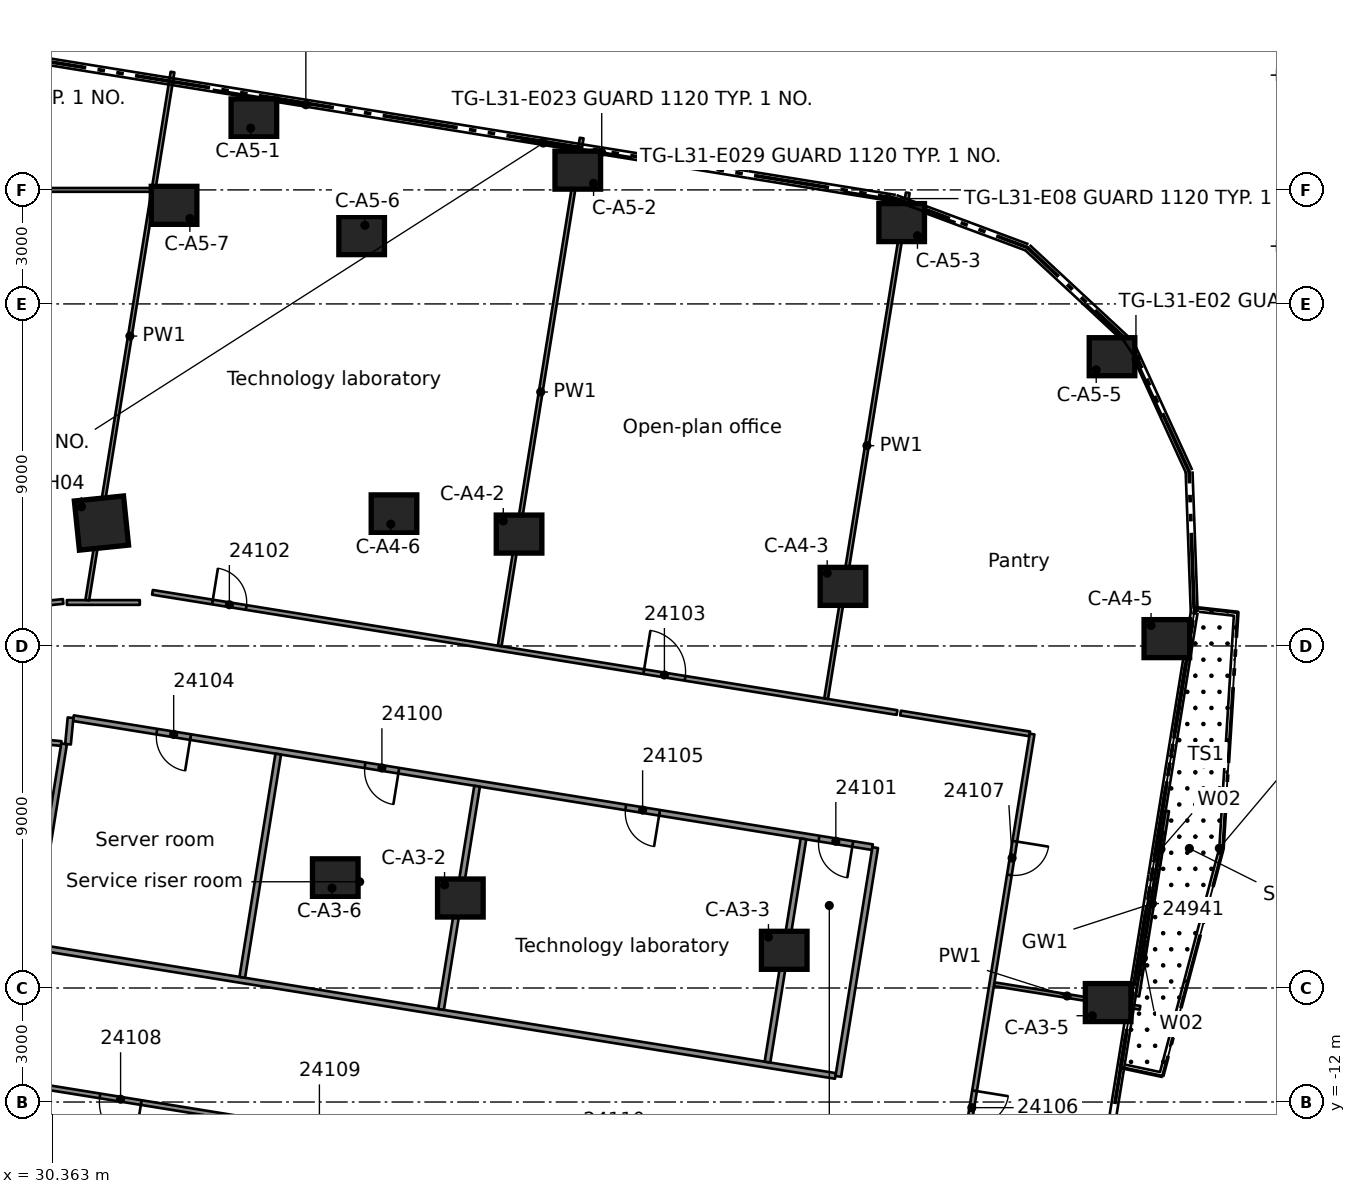
"""IFC4 building model, lengths in metres.
Left out: names, types, materials, properties, quantities, classifications, styles, units other than length and angle.
Written with IfcOpenShell. Run it as: python <this file> out.ifc"""

import sys

from ifc_helpers import new_model, si_unit, direction, frame, frame_2d, origin, origin_2d, place, context, subcontext, project, spatial, rectangle, extrude, element, fill, save


model = new_model("IFC4")
c1 = context("Model", 3, precision=1e-05, world=origin(), true_north=direction((0.0, 1.0)))
c2 = subcontext(c1, "Body", "Model", "MODEL_VIEW")
j1 = project(units=[si_unit("LENGTHUNIT", "METRE"), si_unit("PLANEANGLEUNIT", "RADIAN")], contexts=[c1])
p1 = place(None, origin())
s1 = spatial("IfcSite", under=j1, at=p1, CompositionType="ELEMENT")
p2 = place(p1, origin())
s2 = spatial("IfcBuilding", under=s1, at=p2, CompositionType="ELEMENT")
p3 = place(p2, frame((0.0, 0.0, 123.7)))
s3 = spatial("IfcBuildingStorey", under=s2, at=p3, CompositionType="ELEMENT", Elevation=123.7)
for number, where, z_axis, x_axis in (
    (1, (41.102, -6.632, 0.0), (0.0, 0.0, 1.0), (1.0, 0.0, 0.0)),
    (2, (49.625, -8.008, 0.0), (0.0, 0.0, 1.0), (1.0, 0.0, 0.0)),
    (3, (58.148, -9.383, 0.0), (0.0, 0.0, 1.0), (1.0, 0.0, 0.0)),
    (4, (37.811, -6.101, 0.0), (0.0, 0.0, 1.0), (1.0, 0.0, 0.0)),
    (5, (42.647, 2.944, 0.0), (0.0, 0.0, 1.0), (1.0, 0.0, 0.0)),
    (6, (51.17, 1.568, 0.0), (0.0, 0.0, 1.0), (1.0, 0.0, 0.0)),
    (7, (59.693, 0.193, 0.0), (0.0, 0.0, 1.0), (1.0, 0.0, 0.0)),
    (8, (39.356, 3.475, 0.0), (0.0, 0.0, 1.0), (1.0, 0.0, 0.0)),
    (9, (35.669, 13.895, 0.0), (0.0, 0.0, 1.0), (1.0, 0.0, 0.0)),
    (10, (44.192, 12.52, 0.0), (0.0, 0.0, 1.0), (1.0, 0.0, 0.0)),
    (11, (52.715, 11.14, 0.0), (0.0, 0.0, 1.0), (1.0, 0.0, 0.0)),
    (12, (58.25, 7.611, 0.0), (0.0, 0.0, 1.0), (1.0, 0.0, 0.0)),
    (13, (38.505, 10.797, 0.0), (0.0, 0.0, 1.0), (1.0, 0.0, 0.0)),
    (14, (33.569, 11.594, 0.0), (0.0, 0.0, 1.0), (1.0, 0.0, 0.0)),
):
    element("IfcColumn", number, at=place(p3, frame(where, z_axis=z_axis, x_axis=x_axis)), inside=s3, PredefinedType="COLUMN", context=c2, shape_type="SweptSolid", body=[
        extrude(rectangle(XDim=1.2, YDim=1.0, at=origin_2d()), origin(), (0.0, 0.0, 1.0), 3.5),
    ])
p4 = place(p3, frame((31.658, 3.234, 0.0), z_axis=(0.0, 0.0, 1.0), x_axis=(0.994822339568, 0.101629290543, 0.0)))
e15 = element("IfcColumn", 15, at=p4, inside=s3, PredefinedType="COLUMN", context=c2, shape_type="SweptSolid", body=[
    extrude(rectangle(XDim=1.3, YDim=1.3, at=origin_2d()), origin(), (0.0, 0.0, 1.0), 3.5),
])
p5 = place(p3, frame((59.701, -4.341, 0.0), z_axis=(0.0, 0.0, 1.0), x_axis=(-0.159319524755, -0.987227070654, 0.0)))
e16 = element("IfcWall", 16, at=p5, inside=s3, PredefinedType="STANDARD", context=c2, shape_type="SweptSolid", body=[
    extrude(rectangle(XDim=4.936, YDim=0.1, at=frame_2d((2.468, 0.0))), origin(), (0.0, 0.0, 1.0), 3.1),
])
p6 = place(p5, frame((1.568, 0.0, 0.0)))
e17 = element("IfcOpeningElement", 17, at=p6, cuts=e16, PredefinedType="OPENING", context=c2, shape_type="SweptSolid", body=[
    extrude(rectangle(XDim=1.8, YDim=2.4, at=frame_2d((0.9, 1.2))), frame((0.0, 0.06, 0.0), z_axis=(0.0, -1.0, 0.0), x_axis=(1.0, 0.0, 0.0)), (0.0, 0.0, 1.0), 0.12),
])
p7 = place(p5, frame((0.568, 0.0, 0.0)))
e18 = element("IfcOpeningElement", 18, at=p7, cuts=e16, PredefinedType="OPENING", context=c2, shape_type="SweptSolid", body=[
    extrude(rectangle(XDim=0.9, YDim=2.4, at=frame_2d((0.45, 1.2))), frame((0.0, 0.06, 0.0), z_axis=(0.0, -1.0, 0.0), x_axis=(1.0, 0.0, 0.0)), (0.0, 0.0, 1.0), 0.12),
])
p8 = place(p5, frame((3.468, 0.0, 0.0)))
e19 = element("IfcOpeningElement", 19, at=p8, cuts=e16, PredefinedType="OPENING", context=c2, shape_type="SweptSolid", body=[
    extrude(rectangle(XDim=0.9, YDim=2.4, at=frame_2d((0.45, 1.2))), frame((0.0, 0.06, 0.0), z_axis=(0.0, -1.0, 0.0), x_axis=(1.0, 0.0, 0.0)), (0.0, 0.0, 1.0), 0.12),
])
p9 = place(p3, frame((52.457, -15.204, 0.0), z_axis=(0.0, 0.0, 1.0), x_axis=(-0.987211158264, 0.159418094953, 0.0)))
e20 = element("IfcWall", 20, at=p9, inside=s3, PredefinedType="PARTITIONING", context=c2, shape_type="SweptSolid", body=[
    extrude(rectangle(XDim=23.235, YDim=0.125, at=frame_2d((11.618, 0.0))), origin(), (0.0, 0.0, 1.0), 3.08),
])
p10 = place(p9, frame((20.009, 0.0, 0.0)))
e21 = element("IfcOpeningElement", 21, at=p10, cuts=e20, PredefinedType="OPENING", context=c2, shape_type="SweptSolid", body=[
    extrude(rectangle(XDim=1.1, YDim=2.1, at=frame_2d((0.55, 1.05))), frame((0.0, 0.073, 0.0), z_axis=(0.0, -1.0, 0.0), x_axis=(1.0, 0.0, 0.0)), (0.0, 0.0, 1.0), 0.145),
])
p11 = place(p9, frame((14.709, 0.0, 0.0)))
e22 = element("IfcOpeningElement", 22, at=p11, cuts=e20, PredefinedType="OPENING", context=c2, shape_type="SweptSolid", body=[
    extrude(rectangle(XDim=1.1, YDim=2.1, at=frame_2d((0.55, 1.05))), frame((0.0, 0.073, 0.0), z_axis=(0.0, -1.0, 0.0), x_axis=(1.0, 0.0, 0.0)), (0.0, 0.0, 1.0), 0.145),
])
p12 = place(p9, frame((7.759, 0.0, 0.0)))
e23 = element("IfcOpeningElement", 23, at=p12, cuts=e20, PredefinedType="OPENING", context=c2, shape_type="SweptSolid", body=[
    extrude(rectangle(XDim=0.9, YDim=2.1, at=frame_2d((0.45, 1.05))), frame((0.0, 0.073, 0.0), z_axis=(0.0, -1.0, 0.0), x_axis=(1.0, 0.0, 0.0)), (0.0, 0.0, 1.0), 0.145),
])
p13 = place(p3, frame((30.005, -7.931, 0.0), z_axis=(0.0, 0.0, 1.0), x_axis=(0.987232842174, -0.15928375728, 0.0)))
e24 = element("IfcWall", 24, at=p13, inside=s3, PredefinedType="PARTITIONING", context=c2, shape_type="SweptSolid", body=[
    extrude(rectangle(XDim=21.239, YDim=0.15, at=frame_2d((10.62, 0.0))), origin(), (0.0, 0.0, 1.0), 3.08),
])
p14 = place(p3, frame((55.149, -8.9, 0.0), z_axis=(0.0, 0.0, 1.0), x_axis=(0.987198096363, -0.159498960929, 0.0)))
e25 = element("IfcWall", 25, at=p14, inside=s3, PredefinedType="PARTITIONING", context=c2, shape_type="SweptSolid", body=[
    extrude(rectangle(XDim=3.888, YDim=0.1, at=frame_2d((1.944, 0.0))), origin(), (0.0, 0.0, 1.0), 3.08),
])
p15 = place(p3, frame((51.945, -5.294, 0.0), z_axis=(0.0, 0.0, 1.0), x_axis=(-0.98722094224, 0.159357494967, 0.0)))
e26 = element("IfcWall", 26, at=p15, inside=s3, PredefinedType="PARTITIONING", context=c2, shape_type="SweptSolid", body=[
    extrude(rectangle(XDim=21.298, YDim=0.15, at=frame_2d((10.649, 0.0))), origin(), (0.0, 0.0, 1.0), 3.08),
])
p16 = place(p15, frame((12.624, 0.0, 0.0)))
e27 = element("IfcOpeningElement", 27, at=p16, cuts=e26, PredefinedType="OPENING", context=c2, shape_type="SweptSolid", body=[
    extrude(rectangle(XDim=0.9, YDim=2.1, at=frame_2d((0.45, 1.05))), frame((0.0, 0.085, 0.0), z_axis=(0.0, -1.0, 0.0), x_axis=(1.0, 0.0, 0.0)), (0.0, 0.0, 1.0), 0.17),
])
p17 = place(p15, frame((0.525, 0.0, 0.0)))
e28 = element("IfcOpeningElement", 28, at=p17, cuts=e26, PredefinedType="OPENING", context=c2, shape_type="SweptSolid", body=[
    extrude(rectangle(XDim=0.9, YDim=2.1, at=frame_2d((0.45, 1.05))), frame((0.0, 0.085, 0.0), z_axis=(0.0, -1.0, 0.0), x_axis=(1.0, 0.0, 0.0)), (0.0, 0.0, 1.0), 0.17),
])
p18 = place(p15, frame((18.175, 0.0, 0.0)))
e29 = element("IfcOpeningElement", 29, at=p18, cuts=e26, PredefinedType="OPENING", context=c2, shape_type="SweptSolid", body=[
    extrude(rectangle(XDim=0.9, YDim=2.1, at=frame_2d((0.45, 1.05))), frame((0.0, 0.085, 0.0), z_axis=(0.0, -1.0, 0.0), x_axis=(1.0, 0.0, 0.0)), (0.0, 0.0, 1.0), 0.17),
])
p19 = place(p15, frame((5.675, 0.0, 0.0)))
e30 = element("IfcOpeningElement", 30, at=p19, cuts=e26, PredefinedType="OPENING", context=c2, shape_type="SweptSolid", body=[
    extrude(rectangle(XDim=0.9, YDim=2.1, at=frame_2d((0.45, 1.05))), frame((0.0, 0.085, 0.0), z_axis=(0.0, -1.0, 0.0), x_axis=(1.0, 0.0, 0.0)), (0.0, 0.0, 1.0), 0.17),
])
p20 = place(p3, frame((33.0, 1.411, 0.0), z_axis=(0.0, 0.0, 1.0), x_axis=(0.987218652985, -0.159371676275, 0.0)))
e31 = element("IfcWall", 31, at=p20, inside=s3, PredefinedType="PARTITIONING", context=c2, shape_type="SweptSolid", body=[
    extrude(rectangle(XDim=19.846, YDim=0.125, at=frame_2d((9.923, 0.0))), origin(), (0.0, 0.0, 1.0), 3.08),
])
p21 = place(p20, frame((1.6, 0.0, 0.0)))
e32 = element("IfcOpeningElement", 32, at=p21, cuts=e31, PredefinedType="OPENING", context=c2, shape_type="SweptSolid", body=[
    extrude(rectangle(XDim=0.9, YDim=2.1, at=frame_2d((0.45, 1.05))), frame((0.0, 0.073, 0.0), z_axis=(0.0, -1.0, 0.0), x_axis=(1.0, 0.0, 0.0)), (0.0, 0.0, 1.0), 0.145),
])
p22 = place(p20, frame((13.096, 0.0, 0.0)))
e33 = element("IfcOpeningElement", 33, at=p22, cuts=e31, PredefinedType="OPENING", context=c2, shape_type="SweptSolid", body=[
    extrude(rectangle(XDim=1.1, YDim=2.1, at=frame_2d((0.55, 1.05))), frame((0.0, 0.073, 0.0), z_axis=(0.0, -1.0, 0.0), x_axis=(1.0, 0.0, 0.0)), (0.0, 0.0, 1.0), 0.145),
])
p23 = place(p3, frame((52.685, -1.765, 0.0), z_axis=(0.0, 0.0, 1.0), x_axis=(0.987209106982, -0.159430797185, 0.0)))
e34 = element("IfcWall", 34, at=p23, inside=s3, PredefinedType="PARTITIONING", context=c2, shape_type="SweptSolid", body=[
    extrude(rectangle(XDim=3.444, YDim=0.125, at=frame_2d((1.722, 0.0))), origin(), (0.0, 0.0, 1.0), 3.08),
])
p24 = place(p3, frame((30.6, -2.567, 0.0), z_axis=(0.0, 0.0, 1.0), x_axis=(-0.995450531819, 0.095279791669, 0.0)))
e35 = element("IfcWall", 35, at=p24, inside=s3, PredefinedType="PARTITIONING", context=c2, shape_type="SweptSolid", body=[
    extrude(rectangle(XDim=9.13, YDim=0.125, at=frame_2d((4.565, 0.0))), origin(), (0.0, 0.0, 1.0), 3.08),
])
p25 = place(p24, frame((2.525, 0.0, 0.0)))
e36 = element("IfcOpeningElement", 36, at=p25, cuts=e35, PredefinedType="OPENING", context=c2, shape_type="SweptSolid", body=[
    extrude(rectangle(XDim=0.9, YDim=2.1, at=frame_2d((0.45, 1.05))), frame((0.0, 0.073, 0.0), z_axis=(0.0, -1.0, 0.0), x_axis=(1.0, 0.0, 0.0)), (0.0, 0.0, 1.0), 0.145),
])
p26 = place(p3, frame((30.748, 1.144, 0.0), z_axis=(0.0, 0.0, 1.0), x_axis=(1.0, 0.0, 0.0)))
e37 = element("IfcWall", 37, at=p26, inside=s3, PredefinedType="PARTITIONING", context=c2, shape_type="SweptSolid", body=[
    extrude(rectangle(XDim=1.919, YDim=0.125, at=frame_2d((0.959, 0.0))), origin(), (0.0, 0.0, 1.0), 3.08),
])
p27 = place(p3, frame((21.512, 12.0, 0.0), z_axis=(0.0, 0.0, 1.0), x_axis=(1.0, 0.0, 0.0)))
e38 = element("IfcWall", 38, at=p27, inside=s3, PredefinedType="PARTITIONING", context=c2, shape_type="SweptSolid", body=[
    extrude(rectangle(XDim=11.465, YDim=0.1, at=frame_2d((5.732, 0.0))), origin(), (0.0, 0.0, 1.0), 3.08),
])
p28 = place(p3, frame((29.917, 1.096, 0.0), z_axis=(0.0, 0.0, 1.0), x_axis=(0.994811579601, 0.101734561938, 0.0)))
e39 = element("IfcWall", 39, at=p28, inside=s3, PredefinedType="PARTITIONING", context=c2, shape_type="SweptSolid", body=[
    extrude(rectangle(XDim=0.737, YDim=0.125, at=frame_2d((0.368, 0.0))), origin(), (0.0, 0.0, 1.0), 3.08),
])
p29 = place(p3, frame((56.147, -2.317, 0.0), z_axis=(0.0, 0.0, 1.0), x_axis=(-0.159220326338, -0.987243074263, 0.0)))
e40 = element("IfcWall", 40, at=p29, inside=s3, PredefinedType="PARTITIONING", context=c2, shape_type="SweptSolid", body=[
    extrude(rectangle(XDim=13.308, YDim=0.125, at=frame_2d((6.654, 0.0))), origin(), (0.0, 0.0, 1.0), 3.08),
])
p30 = place(p29, frame((9.508, 0.0, 0.0)))
e41 = element("IfcOpeningElement", 41, at=p30, cuts=e40, PredefinedType="OPENING", context=c2, shape_type="SweptSolid", body=[
    extrude(rectangle(XDim=0.9, YDim=2.1, at=frame_2d((0.45, 1.05))), frame((0.0, 0.073, 0.0), z_axis=(0.0, -1.0, 0.0), x_axis=(1.0, 0.0, 0.0)), (0.0, 0.0, 1.0), 0.145),
])
p31 = place(p29, frame((2.857, 0.0, 0.0)))
e42 = element("IfcOpeningElement", 42, at=p31, cuts=e40, PredefinedType="OPENING", context=c2, shape_type="SweptSolid", body=[
    extrude(rectangle(XDim=0.9, YDim=2.1, at=frame_2d((0.45, 1.05))), frame((0.0, 0.073, 0.0), z_axis=(0.0, -1.0, 0.0), x_axis=(1.0, 0.0, 0.0)), (0.0, 0.0, 1.0), 0.145),
])
p32 = place(p3, frame((51.047, -11.326, 0.0), z_axis=(0.0, 0.0, 1.0), x_axis=(0.159359551121, 0.987220610333, 0.0)))
e43 = element("IfcWall", 43, at=p32, inside=s3, PredefinedType="PARTITIONING", context=c2, shape_type="SweptSolid", body=[
    extrude(rectangle(XDim=6.099, YDim=0.15, at=frame_2d((3.049, 0.0))), origin(), (0.0, 0.0, 1.0), 3.08),
])
p33 = place(p3, frame((49.184, -10.949, 0.0), z_axis=(0.0, 0.0, 1.0), x_axis=(0.159192439694, 0.987247571354, 0.0)))
e44 = element("IfcWall", 44, at=p33, inside=s3, PredefinedType="PARTITIONING", context=c2, shape_type="SweptSolid", body=[
    extrude(rectangle(XDim=5.949, YDim=0.15, at=frame_2d((2.975, 0.0))), origin(), (0.0, 0.0, 1.0), 3.08),
])
p34 = place(p3, frame((50.727, -1.385, 0.0), z_axis=(0.0, 0.0, 1.0), x_axis=(0.159328091928, 0.987225688038, 0.0)))
e45 = element("IfcWall", 45, at=p34, inside=s3, PredefinedType="PARTITIONING", context=c2, shape_type="SweptSolid", body=[
    extrude(rectangle(XDim=13.481, YDim=0.1, at=frame_2d((6.741, 0.0))), origin(), (0.0, 0.0, 1.0), 3.08),
])
p35 = place(p3, frame((40.595, -9.563, 0.0), z_axis=(0.0, 0.0, 1.0), x_axis=(0.159352431511, 0.987221759572, 0.0)))
e46 = element("IfcWall", 46, at=p35, inside=s3, PredefinedType="PARTITIONING", context=c2, shape_type="SweptSolid", body=[
    extrude(rectangle(XDim=5.949, YDim=0.15, at=frame_2d((2.975, 0.0))), origin(), (0.0, 0.0, 1.0), 3.08),
])
p36 = place(p3, frame((42.138, 0.0, 0.0), z_axis=(0.0, 0.0, 1.0), x_axis=(0.159340172949, 0.98722373821, 0.0)))
e47 = element("IfcWall", 47, at=p36, inside=s3, PredefinedType="PARTITIONING", context=c2, shape_type="SweptSolid", body=[
    extrude(rectangle(XDim=13.537, YDim=0.1, at=frame_2d((6.769, 0.0))), origin(), (0.0, 0.0, 1.0), 3.08),
])
p37 = place(p3, frame((35.363, -8.719, 0.0), z_axis=(0.0, 0.0, 1.0), x_axis=(0.159192439694, 0.987247571354, 0.0)))
e48 = element("IfcWall", 48, at=p37, inside=s3, PredefinedType="PARTITIONING", context=c2, shape_type="SweptSolid", body=[
    extrude(rectangle(XDim=5.949, YDim=0.15, at=frame_2d((2.975, 0.0))), origin(), (0.0, 0.0, 1.0), 3.08),
])
p38 = place(p3, frame((29.818, -7.885, 0.0), z_axis=(0.0, 0.0, 1.0), x_axis=(0.159318061913, 0.987227306727, 0.0)))
e49 = element("IfcWall", 49, at=p38, inside=s3, PredefinedType="PARTITIONING", context=c2, shape_type="SweptSolid", body=[
    extrude(rectangle(XDim=5.379, YDim=0.15, at=frame_2d((2.689, 0.0))), origin(), (0.0, 0.0, 1.0), 3.08),
])
p39 = place(p3, frame((31.285, 1.206, 0.0), z_axis=(0.0, 0.0, 1.0), x_axis=(0.159373138674, 0.987218416901, 0.0)))
e50 = element("IfcWall", 50, at=p39, inside=s3, PredefinedType="PARTITIONING", context=c2, shape_type="SweptSolid", body=[
    extrude(rectangle(XDim=14.075, YDim=0.1, at=frame_2d((7.038, 0.0))), origin(), (0.0, 0.0, 1.0), 3.08),
])
p40 = place(p3, frame((30.778, -2.585, 0.0), z_axis=(0.0, 0.0, 1.0), x_axis=(0.095533028174, 0.995426260718, 0.0)))
e51 = element("IfcWall", 51, at=p40, inside=s3, PredefinedType="PARTITIONING", context=c2, shape_type="SweptSolid", body=[
    extrude(rectangle(XDim=0.7, YDim=0.15, at=frame_2d((0.35, 0.0))), origin(), (0.0, 0.0, 1.0), 3.08),
])
p41 = place(p6, origin())
e52 = element("IfcDoor", 52, at=p41, inside=s3, OperationType="DOUBLE_DOOR_SLIDING", PredefinedType="DOOR", context=c2, shape_type="SweptSolid", body=[
    extrude(rectangle(XDim=1.8, YDim=2.4, at=frame_2d((0.9, 1.2))), frame((0.0, 0.025, 0.0), z_axis=(0.0, -1.0, 0.0), x_axis=(1.0, 0.0, 0.0)), (0.0, 0.0, 1.0), 0.05),
])
fill(e17, e52)
p42 = place(p7, origin())
e53 = element("IfcWindow", 53, at=p42, inside=s3, PartitioningType="SINGLE_PANEL", PredefinedType="WINDOW", context=c2, shape_type="SweptSolid", body=[
    extrude(rectangle(XDim=0.9, YDim=2.4, at=frame_2d((0.45, 1.2))), frame((0.0, 0.03, 0.0), z_axis=(0.0, -1.0, 0.0), x_axis=(1.0, 0.0, 0.0)), (0.0, 0.0, 1.0), 0.06),
])
fill(e18, e53)
p43 = place(p8, origin())
e54 = element("IfcWindow", 54, at=p43, inside=s3, PartitioningType="SINGLE_PANEL", PredefinedType="WINDOW", context=c2, shape_type="SweptSolid", body=[
    extrude(rectangle(XDim=0.9, YDim=2.4, at=frame_2d((0.45, 1.2))), frame((0.0, 0.03, 0.0), z_axis=(0.0, -1.0, 0.0), x_axis=(1.0, 0.0, 0.0)), (0.0, 0.0, 1.0), 0.06),
])
fill(e19, e54)
p44 = place(p16, origin())
e55 = element("IfcDoor", 55, at=p44, inside=s3, OperationType="SINGLE_SWING_RIGHT", PredefinedType="DOOR", context=c2, shape_type="SweptSolid", body=[
    extrude(rectangle(XDim=0.9, YDim=2.1, at=frame_2d((0.45, 1.05))), frame((0.0, 0.025, 0.0), z_axis=(0.0, -1.0, 0.0), x_axis=(1.0, 0.0, 0.0)), (0.0, 0.0, 1.0), 0.05),
])
fill(e27, e55)
p45 = place(p17, origin())
e56 = element("IfcDoor", 56, at=p45, inside=s3, OperationType="SINGLE_SWING_LEFT", PredefinedType="DOOR", context=c2, shape_type="SweptSolid", body=[
    extrude(rectangle(XDim=0.9, YDim=2.1, at=frame_2d((0.45, 1.05))), frame((0.0, 0.025, 0.0), z_axis=(0.0, -1.0, 0.0), x_axis=(1.0, 0.0, 0.0)), (0.0, 0.0, 1.0), 0.05),
])
fill(e28, e56)
p46 = place(p21, origin())
e57 = element("IfcDoor", 57, at=p46, inside=s3, OperationType="SINGLE_SWING_LEFT", PredefinedType="DOOR", context=c2, shape_type="SweptSolid", body=[
    extrude(rectangle(XDim=0.9, YDim=2.1, at=frame_2d((0.45, 1.05))), frame((0.0, 0.025, 0.0), z_axis=(0.0, -1.0, 0.0), x_axis=(1.0, 0.0, 0.0)), (0.0, 0.0, 1.0), 0.05),
])
fill(e32, e57)
p47 = place(p22, origin())
e58 = element("IfcDoor", 58, at=p47, inside=s3, OperationType="SINGLE_SWING_RIGHT", PredefinedType="DOOR", context=c2, shape_type="SweptSolid", body=[
    extrude(rectangle(XDim=1.1, YDim=2.1, at=frame_2d((0.55, 1.05))), frame((0.0, 0.025, 0.0), z_axis=(0.0, -1.0, 0.0), x_axis=(1.0, 0.0, 0.0)), (0.0, 0.0, 1.0), 0.05),
])
fill(e33, e58)
p48 = place(p18, origin())
e59 = element("IfcDoor", 59, at=p48, inside=s3, OperationType="SINGLE_SWING_RIGHT", PredefinedType="DOOR", context=c2, shape_type="SweptSolid", body=[
    extrude(rectangle(XDim=0.9, YDim=2.1, at=frame_2d((0.45, 1.05))), frame((0.0, 0.025, 0.0), z_axis=(0.0, -1.0, 0.0), x_axis=(1.0, 0.0, 0.0)), (0.0, 0.0, 1.0), 0.05),
])
fill(e29, e59)
p49 = place(p19, origin())
e60 = element("IfcDoor", 60, at=p49, inside=s3, OperationType="SINGLE_SWING_LEFT", PredefinedType="DOOR", context=c2, shape_type="SweptSolid", body=[
    extrude(rectangle(XDim=0.9, YDim=2.1, at=frame_2d((0.45, 1.05))), frame((0.0, 0.025, 0.0), z_axis=(0.0, -1.0, 0.0), x_axis=(1.0, 0.0, 0.0)), (0.0, 0.0, 1.0), 0.05),
])
fill(e30, e60)
p50 = place(p30, origin())
e61 = element("IfcDoor", 61, at=p50, inside=s3, OperationType="SINGLE_SWING_RIGHT", PredefinedType="DOOR", context=c2, shape_type="SweptSolid", body=[
    extrude(rectangle(XDim=0.9, YDim=2.1, at=frame_2d((0.45, 1.05))), frame((0.0, 0.025, 0.0), z_axis=(0.0, -1.0, 0.0), x_axis=(1.0, 0.0, 0.0)), (0.0, 0.0, 1.0), 0.05),
])
fill(e41, e61)
p51 = place(p31, origin())
e62 = element("IfcDoor", 62, at=p51, inside=s3, OperationType="SINGLE_SWING_LEFT", PredefinedType="DOOR", context=c2, shape_type="SweptSolid", body=[
    extrude(rectangle(XDim=0.9, YDim=2.1, at=frame_2d((0.45, 1.05))), frame((0.0, 0.025, 0.0), z_axis=(0.0, -1.0, 0.0), x_axis=(1.0, 0.0, 0.0)), (0.0, 0.0, 1.0), 0.05),
])
fill(e42, e62)
p52 = place(p10, origin())
e63 = element("IfcDoor", 63, at=p52, inside=s3, OperationType="SINGLE_SWING_RIGHT", PredefinedType="DOOR", context=c2, shape_type="SweptSolid", body=[
    extrude(rectangle(XDim=1.1, YDim=2.1, at=frame_2d((0.55, 1.05))), frame((0.0, 0.025, 0.0), z_axis=(0.0, -1.0, 0.0), x_axis=(1.0, 0.0, 0.0)), (0.0, 0.0, 1.0), 0.05),
])
fill(e21, e63)
save(model, sys.argv[1])
